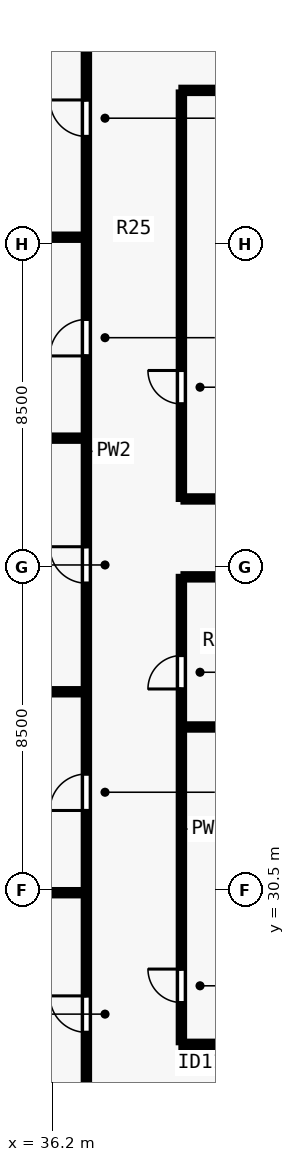
"""IFC4 building model, lengths in metres.
Left out: names, types, materials, properties, quantities, classifications, styles, units other than length and angle.
Written with IfcOpenShell. Run it as: python <this file> out.ifc"""

import sys

from ifc_helpers import new_model, si_unit, direction, frame, frame_2d, origin, place, context, subcontext, project, spatial, rectangle, extrude, element, fill, save


model = new_model("IFC4")
c1 = context("Model", 3, precision=1e-05, world=origin(), true_north=direction((0.0, 1.0)))
c2 = subcontext(c1, "Body", "Model", "MODEL_VIEW")
j1 = project(units=[si_unit("LENGTHUNIT", "METRE"), si_unit("PLANEANGLEUNIT", "RADIAN")], contexts=[c1])
p1 = place(None, origin())
s1 = spatial("IfcSite", under=j1, at=p1, CompositionType="ELEMENT")
p2 = place(p1, origin())
s2 = spatial("IfcBuilding", under=s1, at=p2, CompositionType="ELEMENT")
p3 = place(p2, frame((0.0, 0.0, 55.0)))
s3 = spatial("IfcBuildingStorey", under=s2, at=p3, CompositionType="ELEMENT", Elevation=55.0)
p4 = place(p3, frame((37.1, 24.005, 0.0), z_axis=(0.0, 0.0, 1.0), x_axis=(0.0, 1.0, 0.0)))
e1 = element("IfcWall", 1, at=p4, inside=s3, PredefinedType="PARTITIONING", context=c2, shape_type="SweptSolid", body=[
    extrude(rectangle(XDim=29.99, YDim=0.14, at=frame_2d((14.995, 0.0))), origin(), (0.0, 0.0, 1.0), 3.28),
])
p5 = place(p4, frame((2.76, 0.0, 0.0)))
e2 = element("IfcOpeningElement", 2, at=p5, cuts=e1, PredefinedType="OPENING", context=c2, shape_type="SweptSolid", body=[
    extrude(rectangle(XDim=0.96, YDim=2.12, at=frame_2d((0.48, 1.06))), frame((0.0, 0.08, 0.0), z_axis=(0.0, -1.0, 0.0), x_axis=(1.0, 0.0, 0.0)), (0.0, 0.0, 1.0), 0.16),
])
p6 = place(p4, frame((8.598, 0.0, 0.0)))
e3 = element("IfcOpeningElement", 3, at=p6, cuts=e1, PredefinedType="OPENING", context=c2, shape_type="SweptSolid", body=[
    extrude(rectangle(XDim=0.96, YDim=2.12, at=frame_2d((0.48, 1.06))), frame((0.0, 0.08, 0.0), z_axis=(0.0, -1.0, 0.0), x_axis=(1.0, 0.0, 0.0)), (0.0, 0.0, 1.0), 0.16),
])
p7 = place(p4, frame((14.578, 0.0, 0.0)))
e4 = element("IfcOpeningElement", 4, at=p7, cuts=e1, PredefinedType="OPENING", context=c2, shape_type="SweptSolid", body=[
    extrude(rectangle(XDim=0.96, YDim=2.12, at=frame_2d((0.48, 1.06))), frame((0.0, 0.08, 0.0), z_axis=(0.0, -1.0, 0.0), x_axis=(1.0, 0.0, 0.0)), (0.0, 0.0, 1.0), 0.16),
])
p8 = place(p4, frame((20.558, 0.0, 0.0)))
e5 = element("IfcOpeningElement", 5, at=p8, cuts=e1, PredefinedType="OPENING", context=c2, shape_type="SweptSolid", body=[
    extrude(rectangle(XDim=0.96, YDim=2.12, at=frame_2d((0.48, 1.06))), frame((0.0, 0.08, 0.0), z_axis=(0.0, -1.0, 0.0), x_axis=(1.0, 0.0, 0.0)), (0.0, 0.0, 1.0), 0.16),
])
p9 = place(p4, frame((26.333, 0.0, 0.0)))
e6 = element("IfcOpeningElement", 6, at=p9, cuts=e1, PredefinedType="OPENING", context=c2, shape_type="SweptSolid", body=[
    extrude(rectangle(XDim=0.96, YDim=2.12, at=frame_2d((0.48, 1.06))), frame((0.0, 0.08, 0.0), z_axis=(0.0, -1.0, 0.0), x_axis=(1.0, 0.0, 0.0)), (0.0, 0.0, 1.0), 0.16),
])
p10 = place(p3, frame((39.6, 26.45, 0.0), z_axis=(0.0, 0.0, 1.0), x_axis=(1.0, 0.0, 0.0)))
e7 = element("IfcWall", 7, at=p10, inside=s3, PredefinedType="PARTITIONING", context=c2, shape_type="SweptSolid", body=[
    extrude(rectangle(XDim=24.8, YDim=0.14, at=frame_2d((12.4, 0.0))), origin(), (0.0, 0.0, 1.0), 3.28),
])
p11 = place(p10, frame((2.2, 0.0, 0.0)))
e8 = element("IfcOpeningElement", 8, at=p11, cuts=e7, PredefinedType="OPENING", context=c2, shape_type="SweptSolid", body=[
    extrude(rectangle(XDim=0.96, YDim=2.12, at=frame_2d((0.48, 1.06))), frame((0.0, 0.08, 0.0), z_axis=(0.0, -1.0, 0.0), x_axis=(1.0, 0.0, 0.0)), (0.0, 0.0, 1.0), 0.16),
])
p12 = place(p10, frame((14.4, 0.0, 0.0)))
e9 = element("IfcOpeningElement", 9, at=p12, cuts=e7, PredefinedType="OPENING", context=c2, shape_type="SweptSolid", body=[
    extrude(rectangle(XDim=0.96, YDim=2.12, at=frame_2d((0.48, 1.06))), frame((0.0, 0.08, 0.0), z_axis=(0.0, -1.0, 0.0), x_axis=(1.0, 0.0, 0.0)), (0.0, 0.0, 1.0), 0.16),
])
p13 = place(p3, frame((39.6, 51.55, 0.0), z_axis=(0.0, 0.0, 1.0), x_axis=(1.0, 0.0, 0.0)))
e10 = element("IfcWall", 10, at=p13, inside=s3, PredefinedType="PARTITIONING", context=c2, shape_type="SweptSolid", body=[
    extrude(rectangle(XDim=24.8, YDim=0.14, at=frame_2d((12.4, 0.0))), origin(), (0.0, 0.0, 1.0), 3.28),
])
p14 = place(p13, frame((3.2, 0.0, 0.0)))
e11 = element("IfcOpeningElement", 11, at=p14, cuts=e10, PredefinedType="OPENING", context=c2, shape_type="SweptSolid", body=[
    extrude(rectangle(XDim=0.96, YDim=2.12, at=frame_2d((0.48, 1.06))), frame((0.0, 0.08, 0.0), z_axis=(0.0, -1.0, 0.0), x_axis=(1.0, 0.0, 0.0)), (0.0, 0.0, 1.0), 0.16),
])
p15 = place(p13, frame((18.4, 0.0, 0.0)))
e12 = element("IfcOpeningElement", 12, at=p15, cuts=e10, PredefinedType="OPENING", context=c2, shape_type="SweptSolid", body=[
    extrude(rectangle(XDim=0.96, YDim=2.12, at=frame_2d((0.48, 1.06))), frame((0.0, 0.08, 0.0), z_axis=(0.0, -1.0, 0.0), x_axis=(1.0, 0.0, 0.0)), (0.0, 0.0, 1.0), 0.16),
])
p16 = place(p3, frame((39.6, 26.505, 0.0), z_axis=(0.0, 0.0, 1.0), x_axis=(0.0, 1.0, 0.0)))
e13 = element("IfcWall", 13, at=p16, inside=s3, PredefinedType="PARTITIONING", context=c2, shape_type="SweptSolid", body=[
    extrude(rectangle(XDim=12.245, YDim=0.14, at=frame_2d((6.123, 0.0))), origin(), (0.0, 0.0, 1.0), 3.28),
])
p17 = place(p16, frame((1.045, 0.0, 0.0)))
e14 = element("IfcOpeningElement", 14, at=p17, cuts=e13, PredefinedType="OPENING", context=c2, shape_type="SweptSolid", body=[
    extrude(rectangle(XDim=0.88, YDim=2.1, at=frame_2d((0.44, 1.05))), frame((0.0, 0.08, 0.0), z_axis=(0.0, -1.0, 0.0), x_axis=(1.0, 0.0, 0.0)), (0.0, 0.0, 1.0), 0.16),
])
p18 = place(p16, frame((9.295, 0.0, 0.0)))
e15 = element("IfcOpeningElement", 15, at=p18, cuts=e13, PredefinedType="OPENING", context=c2, shape_type="SweptSolid", body=[
    extrude(rectangle(XDim=0.88, YDim=2.1, at=frame_2d((0.44, 1.05))), frame((0.0, 0.08, 0.0), z_axis=(0.0, -1.0, 0.0), x_axis=(1.0, 0.0, 0.0)), (0.0, 0.0, 1.0), 0.16),
])
p19 = place(p3, frame((39.6, 40.8, 0.0), z_axis=(0.0, 0.0, 1.0), x_axis=(0.0, 1.0, 0.0)))
e16 = element("IfcWall", 16, at=p19, inside=s3, PredefinedType="PARTITIONING", context=c2, shape_type="SweptSolid", body=[
    extrude(rectangle(XDim=10.695, YDim=0.14, at=frame_2d((5.348, 0.0))), origin(), (0.0, 0.0, 1.0), 3.28),
])
p20 = place(p19, frame((2.5, 0.0, 0.0)))
e17 = element("IfcOpeningElement", 17, at=p20, cuts=e16, PredefinedType="OPENING", context=c2, shape_type="SweptSolid", body=[
    extrude(rectangle(XDim=0.88, YDim=2.1, at=frame_2d((0.44, 1.05))), frame((0.0, 0.08, 0.0), z_axis=(0.0, -1.0, 0.0), x_axis=(1.0, 0.0, 0.0)), (0.0, 0.0, 1.0), 0.16),
])
for number, where, z_axis, x_axis in (
    (18, (39.655, 38.75, 0.0), (0.0, 0.0, 1.0), (1.0, 0.0, 0.0)),
    (19, (39.655, 40.8, 0.0), (0.0, 0.0, 1.0), (1.0, 0.0, 0.0)),
    (20, (39.655, 34.8, 0.0), (0.0, 0.0, 1.0), (1.0, 0.0, 0.0)),
):
    element("IfcWall", number, at=place(p3, frame(where, z_axis=z_axis, x_axis=x_axis)), inside=s3, PredefinedType="PARTITIONING", context=c2, shape_type="SweptSolid", body=[
        extrude(rectangle(XDim=3.585, YDim=0.14, at=frame_2d((1.792, 0.0))), origin(), (0.0, 0.0, 1.0), 3.28),
    ])
p21 = place(p3, frame((26.92, 30.439, 0.0), z_axis=(0.0, 0.0, 1.0), x_axis=(1.0, 0.0, 0.0)))
e21 = element("IfcWall", 21, at=p21, inside=s3, PredefinedType="PARTITIONING", context=c2, shape_type="SweptSolid", body=[
    extrude(rectangle(XDim=10.08, YDim=0.14, at=frame_2d((5.04, 0.0))), origin(), (0.0, 0.0, 1.0), 3.28),
])
p22 = place(p3, frame((26.92, 35.727, 0.0), z_axis=(0.0, 0.0, 1.0), x_axis=(1.0, 0.0, 0.0)))
e22 = element("IfcWall", 22, at=p22, inside=s3, PredefinedType="PARTITIONING", context=c2, shape_type="SweptSolid", body=[
    extrude(rectangle(XDim=10.08, YDim=0.14, at=frame_2d((5.04, 0.0))), origin(), (0.0, 0.0, 1.0), 2.849),
])
for number, where, z_axis, x_axis in (
    (23, (26.92, 42.399, 0.0), (0.0, 0.0, 1.0), (1.0, 0.0, 0.0)),
    (24, (26.92, 47.687, 0.0), (0.0, 0.0, 1.0), (1.0, 0.0, 0.0)),
):
    element("IfcWall", number, at=place(p3, frame(where, z_axis=z_axis, x_axis=x_axis)), inside=s3, PredefinedType="PARTITIONING", context=c2, shape_type="SweptSolid", body=[
        extrude(rectangle(XDim=10.08, YDim=0.14, at=frame_2d((5.04, 0.0))), origin(), (0.0, 0.0, 1.0), 3.28),
    ])
p23 = place(p17, origin())
e25 = element("IfcDoor", 25, at=p23, inside=s3, OperationType="SINGLE_SWING_RIGHT", PredefinedType="DOOR", context=c2, shape_type="SweptSolid", body=[
    extrude(rectangle(XDim=0.88, YDim=2.1, at=frame_2d((0.44, 1.05))), frame((0.0, 0.025, 0.0), z_axis=(0.0, -1.0, 0.0), x_axis=(1.0, 0.0, 0.0)), (0.0, 0.0, 1.0), 0.05),
])
fill(e14, e25)
p24 = place(p18, origin())
e26 = element("IfcDoor", 26, at=p24, inside=s3, OperationType="SINGLE_SWING_LEFT", PredefinedType="DOOR", context=c2, shape_type="SweptSolid", body=[
    extrude(rectangle(XDim=0.88, YDim=2.1, at=frame_2d((0.44, 1.05))), frame((0.0, 0.025, 0.0), z_axis=(0.0, -1.0, 0.0), x_axis=(1.0, 0.0, 0.0)), (0.0, 0.0, 1.0), 0.05),
])
fill(e15, e26)
p25 = place(p20, origin())
e27 = element("IfcDoor", 27, at=p25, inside=s3, OperationType="SINGLE_SWING_RIGHT", PredefinedType="DOOR", context=c2, shape_type="SweptSolid", body=[
    extrude(rectangle(XDim=0.88, YDim=2.1, at=frame_2d((0.44, 1.05))), frame((0.0, 0.025, 0.0), z_axis=(0.0, -1.0, 0.0), x_axis=(1.0, 0.0, 0.0)), (0.0, 0.0, 1.0), 0.05),
])
fill(e17, e27)
p26 = place(p5, origin())
e28 = element("IfcDoor", 28, at=p26, inside=s3, OperationType="SINGLE_SWING_RIGHT", PredefinedType="DOOR", context=c2, shape_type="SweptSolid", body=[
    extrude(rectangle(XDim=0.96, YDim=2.12, at=frame_2d((0.48, 1.06))), frame((0.0, 0.025, 0.0), z_axis=(0.0, -1.0, 0.0), x_axis=(1.0, 0.0, 0.0)), (0.0, 0.0, 1.0), 0.05),
])
fill(e2, e28)
p27 = place(p6, origin())
e29 = element("IfcDoor", 29, at=p27, inside=s3, OperationType="SINGLE_SWING_LEFT", PredefinedType="DOOR", context=c2, shape_type="SweptSolid", body=[
    extrude(rectangle(XDim=0.96, YDim=2.12, at=frame_2d((0.48, 1.06))), frame((0.0, 0.025, 0.0), z_axis=(0.0, -1.0, 0.0), x_axis=(1.0, 0.0, 0.0)), (0.0, 0.0, 1.0), 0.05),
])
fill(e3, e29)
p28 = place(p7, origin())
e30 = element("IfcDoor", 30, at=p28, inside=s3, OperationType="SINGLE_SWING_RIGHT", PredefinedType="DOOR", context=c2, shape_type="SweptSolid", body=[
    extrude(rectangle(XDim=0.96, YDim=2.12, at=frame_2d((0.48, 1.06))), frame((0.0, 0.025, 0.0), z_axis=(0.0, -1.0, 0.0), x_axis=(1.0, 0.0, 0.0)), (0.0, 0.0, 1.0), 0.05),
])
fill(e4, e30)
p29 = place(p8, origin())
e31 = element("IfcDoor", 31, at=p29, inside=s3, OperationType="SINGLE_SWING_LEFT", PredefinedType="DOOR", context=c2, shape_type="SweptSolid", body=[
    extrude(rectangle(XDim=0.96, YDim=2.12, at=frame_2d((0.48, 1.06))), frame((0.0, 0.025, 0.0), z_axis=(0.0, -1.0, 0.0), x_axis=(1.0, 0.0, 0.0)), (0.0, 0.0, 1.0), 0.05),
])
fill(e5, e31)
p30 = place(p9, origin())
e32 = element("IfcDoor", 32, at=p30, inside=s3, OperationType="SINGLE_SWING_RIGHT", PredefinedType="DOOR", context=c2, shape_type="SweptSolid", body=[
    extrude(rectangle(XDim=0.96, YDim=2.12, at=frame_2d((0.48, 1.06))), frame((0.0, 0.025, 0.0), z_axis=(0.0, -1.0, 0.0), x_axis=(1.0, 0.0, 0.0)), (0.0, 0.0, 1.0), 0.05),
])
fill(e6, e32)
save(model, sys.argv[1])
